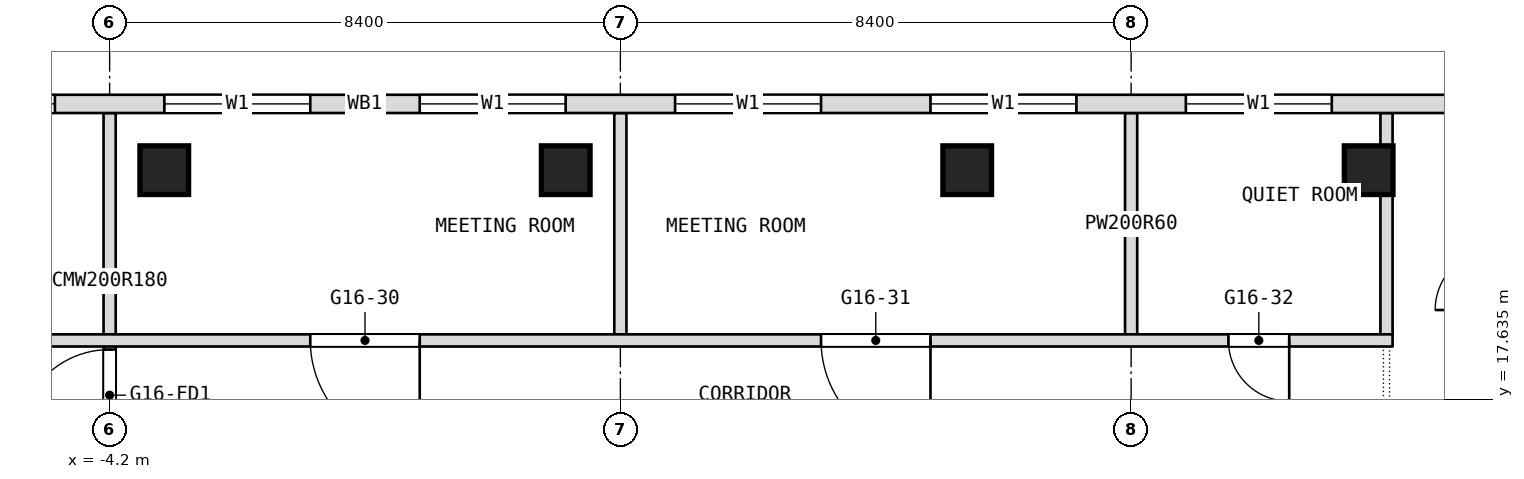
"""IFC4 building model, lengths in metres.
Left out: names, types, materials, properties, quantities, classifications, styles, units other than length and angle.
Written with IfcOpenShell. Run it as: python <this file> out.ifc"""

import sys

from ifc_helpers import new_model, si_unit, direction, frame, frame_2d, origin, origin_2d, place, context, subcontext, project, spatial, rectangle, extrude, element, fill, save


model = new_model("IFC4")
c1 = context("Model", 3, precision=1e-05, world=origin(), true_north=direction((0.0, 1.0)))
c2 = subcontext(c1, "Body", "Model", "MODEL_VIEW")
j1 = project(units=[si_unit("LENGTHUNIT", "METRE"), si_unit("PLANEANGLEUNIT", "RADIAN")], contexts=[c1])
p1 = place(None, origin())
s1 = spatial("IfcSite", under=j1, at=p1, CompositionType="ELEMENT")
p2 = place(p1, origin())
s2 = spatial("IfcBuilding", under=s1, at=p2, CompositionType="ELEMENT")
p3 = place(p2, frame((0.0, 0.0, 205.7)))
s3 = spatial("IfcBuildingStorey", under=s2, at=p3, CompositionType="ELEMENT", Elevation=205.7)
for number, where, z_axis, x_axis in (
    (1, (-3.302, 21.4, 0.0), (0.0, 0.0, 1.0), (1.0, 0.0, 0.0)),
    (2, (3.302, 21.4, 0.0), (0.0, 0.0, 1.0), (1.0, 0.0, 0.0)),
    (3, (9.904, 21.4, 0.0), (0.0, 0.0, 1.0), (1.0, 0.0, 0.0)),
    (4, (16.507, 21.4, 0.0), (0.0, 0.0, 1.0), (1.0, 0.0, 0.0)),
):
    element("IfcColumn", number, at=place(p3, frame(where, z_axis=z_axis, x_axis=x_axis)), inside=s3, PredefinedType="COLUMN", context=c2, shape_type="SweptSolid", body=[
        extrude(rectangle(XDim=0.8, YDim=0.8, at=origin_2d()), origin(), (0.0, 0.0, 1.0), 3.6),
    ])
for number, where, z_axis, x_axis in (
    (5, (16.8, 18.7, 0.0), (0.0, 0.0, 1.0), (0.0, 1.0, 0.0)),
    (6, (12.6, 18.7, 0.0), (0.0, 0.0, 1.0), (0.0, 1.0, 0.0)),
    (7, (4.2, 18.7, 0.0), (0.0, 0.0, 1.0), (0.0, 1.0, 0.0)),
):
    element("IfcWall", number, at=place(p3, frame(where, z_axis=z_axis, x_axis=x_axis)), inside=s3, PredefinedType="PARTITIONING", context=c2, shape_type="SweptSolid", body=[
        extrude(rectangle(XDim=3.64, YDim=0.2, at=frame_2d((1.82, 0.0))), origin(), (0.0, 0.0, 1.0), 3.34),
    ])
p4 = place(p3, frame((-4.2, 16.8, 0.0), z_axis=(0.0, 0.0, 1.0), x_axis=(0.0, 1.0, 0.0)))
e8 = element("IfcWall", 8, at=p4, inside=s3, PredefinedType="PARTITIONING", context=c2, shape_type="SweptSolid", body=[
    extrude(rectangle(XDim=5.54, YDim=0.2, at=frame_2d((2.77, 0.0))), origin(), (0.0, 0.0, 1.0), 3.34),
])
p5 = place(p4, frame((0.15, 0.0, 0.0)))
e9 = element("IfcOpeningElement", 9, at=p5, cuts=e8, PredefinedType="OPENING", context=c2, shape_type="SweptSolid", body=[
    extrude(rectangle(XDim=1.5, YDim=2.1, at=frame_2d((0.75, 1.05))), frame((0.0, 0.1, 0.0), z_axis=(0.0, -1.0, 0.0), x_axis=(1.0, 0.0, 0.0)), (0.0, 0.0, 1.0), 0.2),
])
p6 = place(p3, frame((-16.9, 18.6, 0.0), z_axis=(0.0, 0.0, 1.0), x_axis=(1.0, 0.0, 0.0)))
e10 = element("IfcWall", 10, at=p6, inside=s3, PredefinedType="PARTITIONING", context=c2, shape_type="SweptSolid", body=[
    extrude(rectangle(XDim=33.8, YDim=0.2, at=frame_2d((16.9, 0.0))), origin(), (0.0, 0.0, 1.0), 3.34),
])
p7 = place(p6, frame((1.7, 0.0, 0.0)))
e11 = element("IfcOpeningElement", 11, at=p7, cuts=e10, PredefinedType="OPENING", context=c2, shape_type="SweptSolid", body=[
    extrude(rectangle(XDim=1.0, YDim=2.1, at=frame_2d((0.5, 1.05))), frame((0.0, 0.1, 0.0), z_axis=(0.0, -1.0, 0.0), x_axis=(1.0, 0.0, 0.0)), (0.0, 0.0, 1.0), 0.2),
])
p8 = place(p6, frame((16.0, 0.0, 0.0)))
e12 = element("IfcOpeningElement", 12, at=p8, cuts=e10, PredefinedType="OPENING", context=c2, shape_type="SweptSolid", body=[
    extrude(rectangle(XDim=1.8, YDim=2.1, at=frame_2d((0.9, 1.05))), frame((0.0, 0.1, 0.0), z_axis=(0.0, -1.0, 0.0), x_axis=(1.0, 0.0, 0.0)), (0.0, 0.0, 1.0), 0.2),
])
p9 = place(p6, frame((24.4, 0.0, 0.0)))
e13 = element("IfcOpeningElement", 13, at=p9, cuts=e10, PredefinedType="OPENING", context=c2, shape_type="SweptSolid", body=[
    extrude(rectangle(XDim=1.8, YDim=2.1, at=frame_2d((0.9, 1.05))), frame((0.0, 0.1, 0.0), z_axis=(0.0, -1.0, 0.0), x_axis=(1.0, 0.0, 0.0)), (0.0, 0.0, 1.0), 0.2),
])
p10 = place(p6, frame((31.1, 0.0, 0.0)))
e14 = element("IfcOpeningElement", 14, at=p10, cuts=e10, PredefinedType="OPENING", context=c2, shape_type="SweptSolid", body=[
    extrude(rectangle(XDim=1.0, YDim=2.1, at=frame_2d((0.5, 1.05))), frame((0.0, 0.1, 0.0), z_axis=(0.0, -1.0, 0.0), x_axis=(1.0, 0.0, 0.0)), (0.0, 0.0, 1.0), 0.2),
])
p11 = place(p6, frame((5.9, 0.0, 0.0)))
e15 = element("IfcOpeningElement", 15, at=p11, cuts=e10, PredefinedType="OPENING", context=c2, shape_type="SweptSolid", body=[
    extrude(rectangle(XDim=1.0, YDim=2.1, at=frame_2d((0.5, 1.05))), frame((0.0, 0.1, 0.0), z_axis=(0.0, -1.0, 0.0), x_axis=(1.0, 0.0, 0.0)), (0.0, 0.0, 1.0), 0.2),
])
p12 = place(p6, frame((10.1, 0.0, 0.0)))
e16 = element("IfcOpeningElement", 16, at=p12, cuts=e10, PredefinedType="OPENING", context=c2, shape_type="SweptSolid", body=[
    extrude(rectangle(XDim=1.0, YDim=2.1, at=frame_2d((0.5, 1.05))), frame((0.0, 0.1, 0.0), z_axis=(0.0, -1.0, 0.0), x_axis=(1.0, 0.0, 0.0)), (0.0, 0.0, 1.0), 0.2),
])
p13 = place(p3, frame((19.206, 22.49, 0.0), z_axis=(0.0, 0.0, 1.0), x_axis=(-1.0, 0.0, 0.0)))
e17 = element("IfcWall", 17, at=p13, inside=s3, PredefinedType="NOTDEFINED", context=c2, shape_type="SweptSolid", body=[
    extrude(rectangle(XDim=38.412, YDim=0.3, at=frame_2d((19.206, 0.0))), origin(), (0.0, 0.0, 1.0), 3.6),
])
p14 = place(p13, frame((3.306, 0.0, 0.9)))
e18 = element("IfcOpeningElement", 18, at=p14, cuts=e17, PredefinedType="OPENING", context=c2, shape_type="SweptSolid", body=[
    extrude(rectangle(XDim=2.4, YDim=2.1, at=frame_2d((1.2, 1.05))), frame((0.0, 0.15, 0.0), z_axis=(0.0, -1.0, 0.0), x_axis=(1.0, 0.0, 0.0)), (0.0, 0.0, 1.0), 0.3),
])
p15 = place(p13, frame((7.506, 0.0, 0.9)))
e19 = element("IfcOpeningElement", 19, at=p15, cuts=e17, PredefinedType="OPENING", context=c2, shape_type="SweptSolid", body=[
    extrude(rectangle(XDim=2.4, YDim=2.1, at=frame_2d((1.2, 1.05))), frame((0.0, 0.15, 0.0), z_axis=(0.0, -1.0, 0.0), x_axis=(1.0, 0.0, 0.0)), (0.0, 0.0, 1.0), 0.3),
])
p16 = place(p13, frame((11.706, 0.0, 0.9)))
e20 = element("IfcOpeningElement", 20, at=p16, cuts=e17, PredefinedType="OPENING", context=c2, shape_type="SweptSolid", body=[
    extrude(rectangle(XDim=2.4, YDim=2.1, at=frame_2d((1.2, 1.05))), frame((0.0, 0.15, 0.0), z_axis=(0.0, -1.0, 0.0), x_axis=(1.0, 0.0, 0.0)), (0.0, 0.0, 1.0), 0.3),
])
p17 = place(p13, frame((15.906, 0.0, 0.9)))
e21 = element("IfcOpeningElement", 21, at=p17, cuts=e17, PredefinedType="OPENING", context=c2, shape_type="SweptSolid", body=[
    extrude(rectangle(XDim=2.4, YDim=2.1, at=frame_2d((1.2, 1.05))), frame((0.0, 0.15, 0.0), z_axis=(0.0, -1.0, 0.0), x_axis=(1.0, 0.0, 0.0)), (0.0, 0.0, 1.0), 0.3),
])
p18 = place(p13, frame((20.106, 0.0, 0.9)))
e22 = element("IfcOpeningElement", 22, at=p18, cuts=e17, PredefinedType="OPENING", context=c2, shape_type="SweptSolid", body=[
    extrude(rectangle(XDim=2.4, YDim=2.1, at=frame_2d((1.2, 1.05))), frame((0.0, 0.15, 0.0), z_axis=(0.0, -1.0, 0.0), x_axis=(1.0, 0.0, 0.0)), (0.0, 0.0, 1.0), 0.3),
])
p19 = place(p13, frame((24.306, 0.0, 0.9)))
e23 = element("IfcOpeningElement", 23, at=p19, cuts=e17, PredefinedType="OPENING", context=c2, shape_type="SweptSolid", body=[
    extrude(rectangle(XDim=2.4, YDim=2.1, at=frame_2d((1.2, 1.05))), frame((0.0, 0.15, 0.0), z_axis=(0.0, -1.0, 0.0), x_axis=(1.0, 0.0, 0.0)), (0.0, 0.0, 1.0), 0.3),
])
p20 = place(p13, frame((28.506, 0.0, 0.9)))
e24 = element("IfcOpeningElement", 24, at=p20, cuts=e17, PredefinedType="OPENING", context=c2, shape_type="SweptSolid", body=[
    extrude(rectangle(XDim=2.4, YDim=2.1, at=frame_2d((1.2, 1.05))), frame((0.0, 0.15, 0.0), z_axis=(0.0, -1.0, 0.0), x_axis=(1.0, 0.0, 0.0)), (0.0, 0.0, 1.0), 0.3),
])
p21 = place(p13, frame((32.706, 0.0, 0.9)))
e25 = element("IfcOpeningElement", 25, at=p21, cuts=e17, PredefinedType="OPENING", context=c2, shape_type="SweptSolid", body=[
    extrude(rectangle(XDim=2.4, YDim=2.1, at=frame_2d((1.2, 1.05))), frame((0.0, 0.15, 0.0), z_axis=(0.0, -1.0, 0.0), x_axis=(1.0, 0.0, 0.0)), (0.0, 0.0, 1.0), 0.3),
])
p22 = place(p8, origin())
e26 = element("IfcDoor", 26, at=p22, inside=s3, OperationType="DOUBLE_DOOR_SINGLE_SWING", PredefinedType="DOOR", context=c2, shape_type="SweptSolid", body=[
    extrude(rectangle(XDim=1.8, YDim=2.1, at=frame_2d((0.9, 1.05))), frame((0.0, 0.025, 0.0), z_axis=(0.0, -1.0, 0.0), x_axis=(1.0, 0.0, 0.0)), (0.0, 0.0, 1.0), 0.05),
])
fill(e12, e26)
p23 = place(p9, origin())
e27 = element("IfcDoor", 27, at=p23, inside=s3, OperationType="DOUBLE_DOOR_SINGLE_SWING", PredefinedType="DOOR", context=c2, shape_type="SweptSolid", body=[
    extrude(rectangle(XDim=1.8, YDim=2.1, at=frame_2d((0.9, 1.05))), frame((0.0, 0.025, 0.0), z_axis=(0.0, -1.0, 0.0), x_axis=(1.0, 0.0, 0.0)), (0.0, 0.0, 1.0), 0.05),
])
fill(e13, e27)
p24 = place(p10, origin())
e28 = element("IfcDoor", 28, at=p24, inside=s3, OperationType="SINGLE_SWING_RIGHT", PredefinedType="DOOR", context=c2, shape_type="SweptSolid", body=[
    extrude(rectangle(XDim=1.0, YDim=2.1, at=frame_2d((0.5, 1.05))), frame((0.0, 0.025, 0.0), z_axis=(0.0, -1.0, 0.0), x_axis=(1.0, 0.0, 0.0)), (0.0, 0.0, 1.0), 0.05),
])
fill(e14, e28)
p25 = place(p14, origin())
e29 = element("IfcWindow", 29, at=p25, inside=s3, PartitioningType="SINGLE_PANEL", PredefinedType="WINDOW", context=c2, shape_type="SweptSolid", body=[
    extrude(rectangle(XDim=2.4, YDim=2.1, at=frame_2d((1.2, 1.05))), frame((0.0, 0.03, 0.0), z_axis=(0.0, -1.0, 0.0), x_axis=(1.0, 0.0, 0.0)), (0.0, 0.0, 1.0), 0.06),
])
fill(e18, e29)
p26 = place(p15, origin())
e30 = element("IfcWindow", 30, at=p26, inside=s3, PartitioningType="SINGLE_PANEL", PredefinedType="WINDOW", context=c2, shape_type="SweptSolid", body=[
    extrude(rectangle(XDim=2.4, YDim=2.1, at=frame_2d((1.2, 1.05))), frame((0.0, 0.03, 0.0), z_axis=(0.0, -1.0, 0.0), x_axis=(1.0, 0.0, 0.0)), (0.0, 0.0, 1.0), 0.06),
])
fill(e19, e30)
p27 = place(p16, origin())
e31 = element("IfcWindow", 31, at=p27, inside=s3, PartitioningType="SINGLE_PANEL", PredefinedType="WINDOW", context=c2, shape_type="SweptSolid", body=[
    extrude(rectangle(XDim=2.4, YDim=2.1, at=frame_2d((1.2, 1.05))), frame((0.0, 0.03, 0.0), z_axis=(0.0, -1.0, 0.0), x_axis=(1.0, 0.0, 0.0)), (0.0, 0.0, 1.0), 0.06),
])
fill(e20, e31)
p28 = place(p17, origin())
e32 = element("IfcWindow", 32, at=p28, inside=s3, PartitioningType="SINGLE_PANEL", PredefinedType="WINDOW", context=c2, shape_type="SweptSolid", body=[
    extrude(rectangle(XDim=2.4, YDim=2.1, at=frame_2d((1.2, 1.05))), frame((0.0, 0.03, 0.0), z_axis=(0.0, -1.0, 0.0), x_axis=(1.0, 0.0, 0.0)), (0.0, 0.0, 1.0), 0.06),
])
fill(e21, e32)
p29 = place(p18, origin())
e33 = element("IfcWindow", 33, at=p29, inside=s3, PartitioningType="SINGLE_PANEL", PredefinedType="WINDOW", context=c2, shape_type="SweptSolid", body=[
    extrude(rectangle(XDim=2.4, YDim=2.1, at=frame_2d((1.2, 1.05))), frame((0.0, 0.03, 0.0), z_axis=(0.0, -1.0, 0.0), x_axis=(1.0, 0.0, 0.0)), (0.0, 0.0, 1.0), 0.06),
])
fill(e22, e33)
p30 = place(p19, origin())
e34 = element("IfcWindow", 34, at=p30, inside=s3, PartitioningType="SINGLE_PANEL", PredefinedType="WINDOW", context=c2, shape_type="SweptSolid", body=[
    extrude(rectangle(XDim=2.4, YDim=2.1, at=frame_2d((1.2, 1.05))), frame((0.0, 0.03, 0.0), z_axis=(0.0, -1.0, 0.0), x_axis=(1.0, 0.0, 0.0)), (0.0, 0.0, 1.0), 0.06),
])
fill(e23, e34)
p31 = place(p5, origin())
e35 = element("IfcDoor", 35, at=p31, inside=s3, OperationType="DOUBLE_DOOR_DOUBLE_SWING", PredefinedType="DOOR", context=c2, shape_type="SweptSolid", body=[
    extrude(rectangle(XDim=1.5, YDim=2.1, at=frame_2d((0.75, 1.05))), frame((0.0, 0.025, 0.0), z_axis=(0.0, -1.0, 0.0), x_axis=(1.0, 0.0, 0.0)), (0.0, 0.0, 1.0), 0.05),
])
fill(e9, e35)
save(model, sys.argv[1])
